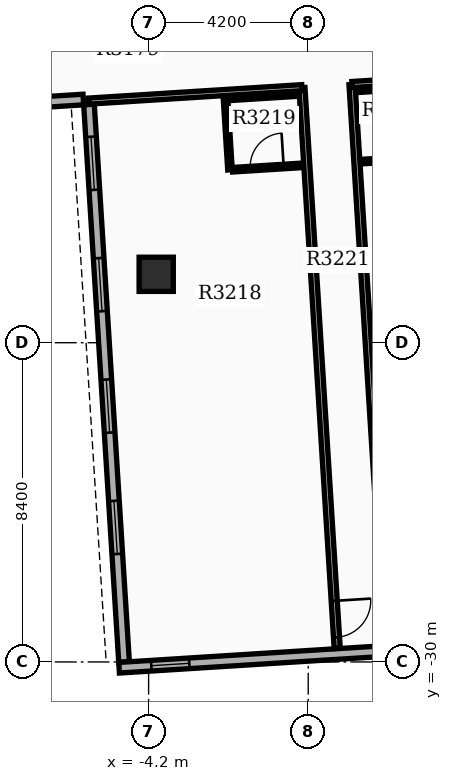
"""IFC4 building model, lengths in metres.
Left out: names, types, materials, properties, quantities, classifications, styles, units other than length and angle.
Written with IfcOpenShell. Run it as: python <this file> out.ifc"""

import sys

from ifc_helpers import new_model, si_unit, direction, frame, frame_2d, origin, origin_2d, place, context, subcontext, project, spatial, rectangle, extrude, element, fill, save


model = new_model("IFC4")
c1 = context("Model", 3, precision=1e-05, world=origin(), true_north=direction((0.0, 1.0)))
c2 = subcontext(c1, "Body", "Model", "MODEL_VIEW")
j1 = project(units=[si_unit("LENGTHUNIT", "METRE"), si_unit("PLANEANGLEUNIT", "RADIAN")], contexts=[c1])
p1 = place(None, origin())
s1 = spatial("IfcSite", under=j1, at=p1, CompositionType="ELEMENT")
p2 = place(p1, origin())
s2 = spatial("IfcBuilding", under=s1, at=p2, CompositionType="ELEMENT")
p3 = place(p2, frame((0.0, 0.0, 201.3)))
s3 = spatial("IfcBuildingStorey", under=s2, at=p3, CompositionType="ELEMENT", Elevation=201.3)
p4 = place(p3, frame((-4.0, -19.8, 0.0), z_axis=(0.0, 0.0, 1.0), x_axis=(1.0, 0.0, 0.0)))
e1 = element("IfcColumn", 1, at=p4, inside=s3, PredefinedType="COLUMN", context=c2, shape_type="SweptSolid", body=[
    extrude(rectangle(XDim=0.9, YDim=0.9, at=origin_2d()), origin(), (0.0, 0.0, 1.0), 3.9),
])
p5 = place(p3, frame((-5.769, -15.333, 0.0), z_axis=(0.0, 0.0, 1.0), x_axis=(0.062779465852, -0.998027423805, 0.0)))
e2 = element("IfcWall", 2, at=p5, inside=s3, PredefinedType="STANDARD", context=c2, shape_type="SweptSolid", body=[
    extrude(rectangle(XDim=14.7, YDim=0.28, at=frame_2d((7.35, 0.0))), origin(), (0.0, 0.0, 1.0), 3.18),
])
p6 = place(p5, frame((0.85, 0.0, 0.8)))
e3 = element("IfcOpeningElement", 3, at=p6, cuts=e2, PredefinedType="OPENING", context=c2, shape_type="SweptSolid", body=[
    extrude(rectangle(XDim=1.4, YDim=1.6, at=frame_2d((0.7, 0.8))), frame((0.0, 0.15, 0.0), z_axis=(0.0, -1.0, 0.0), x_axis=(1.0, 0.0, 0.0)), (0.0, 0.0, 1.0), 0.3),
])
p7 = place(p5, frame((4.05, 0.0, 0.8)))
e4 = element("IfcOpeningElement", 4, at=p7, cuts=e2, PredefinedType="OPENING", context=c2, shape_type="SweptSolid", body=[
    extrude(rectangle(XDim=1.4, YDim=1.6, at=frame_2d((0.7, 0.8))), frame((0.0, 0.15, 0.0), z_axis=(0.0, -1.0, 0.0), x_axis=(1.0, 0.0, 0.0)), (0.0, 0.0, 1.0), 0.3),
])
p8 = place(p5, frame((7.25, 0.0, 0.8)))
e5 = element("IfcOpeningElement", 5, at=p8, cuts=e2, PredefinedType="OPENING", context=c2, shape_type="SweptSolid", body=[
    extrude(rectangle(XDim=1.4, YDim=1.6, at=frame_2d((0.7, 0.8))), frame((0.0, 0.15, 0.0), z_axis=(0.0, -1.0, 0.0), x_axis=(1.0, 0.0, 0.0)), (0.0, 0.0, 1.0), 0.3),
])
p9 = place(p5, frame((10.45, 0.0, 0.8)))
e6 = element("IfcOpeningElement", 6, at=p9, cuts=e2, PredefinedType="OPENING", context=c2, shape_type="SweptSolid", body=[
    extrude(rectangle(XDim=1.4, YDim=1.6, at=frame_2d((0.7, 0.8))), frame((0.0, 0.15, 0.0), z_axis=(0.0, -1.0, 0.0), x_axis=(1.0, 0.0, 0.0)), (0.0, 0.0, 1.0), 0.3),
])
p10 = place(p3, frame((-4.977, -30.152, 0.0), z_axis=(0.0, 0.0, 1.0), x_axis=(0.998026318072, 0.062797041623, 0.0)))
e7 = element("IfcWall", 7, at=p10, inside=s3, PredefinedType="STANDARD", context=c2, shape_type="SweptSolid", body=[
    extrude(rectangle(XDim=13.72, YDim=0.28, at=frame_2d((6.86, 0.0))), origin(), (0.0, 0.0, 1.0), 3.18),
])
p11 = place(p10, frame((0.85, 0.0, 0.85)))
e8 = element("IfcOpeningElement", 8, at=p11, cuts=e7, PredefinedType="OPENING", context=c2, shape_type="SweptSolid", body=[
    extrude(rectangle(XDim=1.0, YDim=1.5, at=frame_2d((0.5, 0.75))), frame((0.0, 0.15, 0.0), z_axis=(0.0, -1.0, 0.0), x_axis=(1.0, 0.0, 0.0)), (0.0, 0.0, 1.0), 0.3),
])
p12 = place(p3, frame((-12.205, -15.597, 0.0), z_axis=(0.0, 0.0, 1.0), x_axis=(0.998024885752, 0.062819801181, 0.0)))
e9 = element("IfcWall", 9, at=p12, inside=s3, PredefinedType="STANDARD", context=c2, shape_type="SweptSolid", body=[
    extrude(rectangle(XDim=6.3, YDim=0.28, at=frame_2d((3.15, 0.0))), origin(), (0.0, 0.0, 1.0), 3.18),
])
p13 = place(p3, frame((1.152, -14.807, 0.0), z_axis=(0.0, 0.0, 1.0), x_axis=(0.062777235242, -0.998027564116, 0.0)))
e10 = element("IfcWall", 10, at=p13, inside=s3, PredefinedType="PARTITIONING", context=c2, shape_type="SweptSolid", body=[
    extrude(rectangle(XDim=14.782, YDim=0.16, at=frame_2d((7.391, 0.0))), origin(), (0.0, 0.0, 1.0), 3.17),
])
p14 = place(p13, frame((13.53, 0.0, 0.0)))
e11 = element("IfcOpeningElement", 11, at=p14, cuts=e10, PredefinedType="OPENING", context=c2, shape_type="SweptSolid", body=[
    extrude(rectangle(XDim=0.96, YDim=2.15, at=frame_2d((0.48, 1.075))), frame((0.0, 0.09, 0.0), z_axis=(0.0, -1.0, 0.0), x_axis=(1.0, 0.0, 0.0)), (0.0, 0.0, 1.0), 0.18),
])
p15 = place(p3, frame((1.152, -14.807, 0.0), z_axis=(0.0, 0.0, 1.0), x_axis=(0.998026035463, 0.062801532923, 0.0)))
e12 = element("IfcWall", 12, at=p15, inside=s3, PredefinedType="PARTITIONING", context=c2, shape_type="SweptSolid", body=[
    extrude(rectangle(XDim=6.5, YDim=0.16, at=frame_2d((3.25, 0.0))), origin(), (0.0, 0.0, 1.0), 3.17),
])
p16 = place(p3, frame((1.42, -16.834, 0.0), z_axis=(0.0, 0.0, 1.0), x_axis=(0.998026915151, 0.062787551592, 0.0)))
e13 = element("IfcWall", 13, at=p16, inside=s3, PredefinedType="PARTITIONING", context=c2, shape_type="SweptSolid", body=[
    extrude(rectangle(XDim=1.82, YDim=0.12, at=frame_2d((0.91, 0.0))), origin(), (0.0, 0.0, 1.0), 3.17),
])
p17 = place(p16, frame((0.47, 0.0, 0.0)))
e14 = element("IfcOpeningElement", 14, at=p17, cuts=e13, PredefinedType="OPENING", context=c2, shape_type="SweptSolid", body=[
    extrude(rectangle(XDim=0.88, YDim=2.1, at=frame_2d((0.44, 1.05))), frame((0.0, 0.07, 0.0), z_axis=(0.0, -1.0, 0.0), x_axis=(1.0, 0.0, 0.0)), (0.0, 0.0, 1.0), 0.14),
])
p18 = place(p3, frame((1.302, -14.958, 0.0), z_axis=(0.0, 0.0, 1.0), x_axis=(0.998027443946, 0.062779145668, 0.0)))
e15 = element("IfcWall", 15, at=p18, inside=s3, PredefinedType="PARTITIONING", context=c2, shape_type="SweptSolid", body=[
    extrude(rectangle(XDim=1.82, YDim=0.12, at=frame_2d((0.91, 0.0))), origin(), (0.0, 0.0, 1.0), 3.17),
])
p19 = place(p3, frame((-0.165, -14.89, 0.0), z_axis=(0.0, 0.0, 1.0), x_axis=(0.062778270041, -0.998027499025, 0.0)))
e16 = element("IfcWall", 16, at=p19, inside=s3, PredefinedType="PARTITIONING", context=c2, shape_type="SweptSolid", body=[
    extrude(rectangle(XDim=14.782, YDim=0.16, at=frame_2d((7.391, 0.0))), origin(), (0.0, 0.0, 1.0), 3.17),
])
p20 = place(p19, frame((13.53, 0.0, 0.0)))
e17 = element("IfcOpeningElement", 17, at=p20, cuts=e16, PredefinedType="OPENING", context=c2, shape_type="SweptSolid", body=[
    extrude(rectangle(XDim=0.96, YDim=2.15, at=frame_2d((0.48, 1.075))), frame((0.0, 0.09, 0.0), z_axis=(0.0, -1.0, 0.0), x_axis=(1.0, 0.0, 0.0)), (0.0, 0.0, 1.0), 0.18),
])
p21 = place(p3, frame((-0.165, -14.89, 0.0), z_axis=(0.0, 0.0, 1.0), x_axis=(-0.998027992644, -0.062770422171, 0.0)))
e18 = element("IfcWall", 18, at=p21, inside=s3, PredefinedType="PARTITIONING", context=c2, shape_type="SweptSolid", body=[
    extrude(rectangle(XDim=5.62, YDim=0.16, at=frame_2d((2.81, 0.0))), origin(), (0.0, 0.0, 1.0), 3.17),
])
p22 = place(p3, frame((-1.993, -17.049, 0.0), z_axis=(0.0, 0.0, 1.0), x_axis=(0.998027443946, 0.062779145668, 0.0)))
e19 = element("IfcWall", 19, at=p22, inside=s3, PredefinedType="PARTITIONING", context=c2, shape_type="SweptSolid", body=[
    extrude(rectangle(XDim=1.82, YDim=0.12, at=frame_2d((0.91, 0.0))), origin(), (0.0, 0.0, 1.0), 3.17),
])
p23 = place(p22, frame((0.47, 0.0, 0.0)))
e20 = element("IfcOpeningElement", 20, at=p23, cuts=e19, PredefinedType="OPENING", context=c2, shape_type="SweptSolid", body=[
    extrude(rectangle(XDim=0.88, YDim=2.1, at=frame_2d((0.44, 1.05))), frame((0.0, 0.07, 0.0), z_axis=(0.0, -1.0, 0.0), x_axis=(1.0, 0.0, 0.0)), (0.0, 0.0, 1.0), 0.14),
])
p24 = place(p3, frame((-2.112, -15.173, 0.0), z_axis=(0.0, 0.0, 1.0), x_axis=(0.998019030272, 0.062912758763, 0.0)))
e21 = element("IfcWall", 21, at=p24, inside=s3, PredefinedType="PARTITIONING", context=c2, shape_type="SweptSolid", body=[
    extrude(rectangle(XDim=1.82, YDim=0.12, at=frame_2d((0.91, 0.0))), origin(), (0.0, 0.0, 1.0), 3.17),
])
p25 = place(p3, frame((-2.176, -15.177, 0.0), z_axis=(0.0, 0.0, 1.0), x_axis=(0.062717813936, -0.998031300018, 0.0)))
e22 = element("IfcWall", 22, at=p25, inside=s3, PredefinedType="PARTITIONING", context=c2, shape_type="SweptSolid", body=[
    extrude(rectangle(XDim=1.88, YDim=0.12, at=frame_2d((0.94, 0.0))), origin(), (0.0, 0.0, 1.0), 3.17),
])
p26 = place(p6, origin())
e23 = element("IfcWindow", 23, at=p26, inside=s3, PartitioningType="SINGLE_PANEL", PredefinedType="WINDOW", context=c2, shape_type="SweptSolid", body=[
    extrude(rectangle(XDim=1.4, YDim=1.6, at=frame_2d((0.7, 0.8))), frame((0.0, 0.03, 0.0), z_axis=(0.0, -1.0, 0.0), x_axis=(1.0, 0.0, 0.0)), (0.0, 0.0, 1.0), 0.06),
])
fill(e3, e23)
p27 = place(p7, origin())
e24 = element("IfcWindow", 24, at=p27, inside=s3, PartitioningType="SINGLE_PANEL", PredefinedType="WINDOW", context=c2, shape_type="SweptSolid", body=[
    extrude(rectangle(XDim=1.4, YDim=1.6, at=frame_2d((0.7, 0.8))), frame((0.0, 0.03, 0.0), z_axis=(0.0, -1.0, 0.0), x_axis=(1.0, 0.0, 0.0)), (0.0, 0.0, 1.0), 0.06),
])
fill(e4, e24)
p28 = place(p8, origin())
e25 = element("IfcWindow", 25, at=p28, inside=s3, PartitioningType="SINGLE_PANEL", PredefinedType="WINDOW", context=c2, shape_type="SweptSolid", body=[
    extrude(rectangle(XDim=1.4, YDim=1.6, at=frame_2d((0.7, 0.8))), frame((0.0, 0.03, 0.0), z_axis=(0.0, -1.0, 0.0), x_axis=(1.0, 0.0, 0.0)), (0.0, 0.0, 1.0), 0.06),
])
fill(e5, e25)
p29 = place(p9, origin())
e26 = element("IfcWindow", 26, at=p29, inside=s3, PartitioningType="SINGLE_PANEL", PredefinedType="WINDOW", context=c2, shape_type="SweptSolid", body=[
    extrude(rectangle(XDim=1.4, YDim=1.6, at=frame_2d((0.7, 0.8))), frame((0.0, 0.03, 0.0), z_axis=(0.0, -1.0, 0.0), x_axis=(1.0, 0.0, 0.0)), (0.0, 0.0, 1.0), 0.06),
])
fill(e6, e26)
p30 = place(p11, origin())
e27 = element("IfcWindow", 27, at=p30, inside=s3, PartitioningType="SINGLE_PANEL", PredefinedType="WINDOW", context=c2, shape_type="SweptSolid", body=[
    extrude(rectangle(XDim=1.0, YDim=1.5, at=frame_2d((0.5, 0.75))), frame((0.0, 0.03, 0.0), z_axis=(0.0, -1.0, 0.0), x_axis=(1.0, 0.0, 0.0)), (0.0, 0.0, 1.0), 0.06),
])
fill(e8, e27)
p31 = place(p20, origin())
e28 = element("IfcDoor", 28, at=p31, inside=s3, OperationType="SINGLE_SWING_LEFT", PredefinedType="DOOR", context=c2, shape_type="SweptSolid", body=[
    extrude(rectangle(XDim=0.96, YDim=2.15, at=frame_2d((0.48, 1.075))), frame((0.0, 0.025, 0.0), z_axis=(0.0, -1.0, 0.0), x_axis=(1.0, 0.0, 0.0)), (0.0, 0.0, 1.0), 0.05),
])
fill(e17, e28)
p32 = place(p23, origin())
e29 = element("IfcDoor", 29, at=p32, inside=s3, OperationType="SINGLE_SWING_RIGHT", PredefinedType="DOOR", context=c2, shape_type="SweptSolid", body=[
    extrude(rectangle(XDim=0.88, YDim=2.1, at=frame_2d((0.44, 1.05))), frame((0.0, 0.025, 0.0), z_axis=(0.0, -1.0, 0.0), x_axis=(1.0, 0.0, 0.0)), (0.0, 0.0, 1.0), 0.05),
])
fill(e20, e29)
save(model, sys.argv[1])
